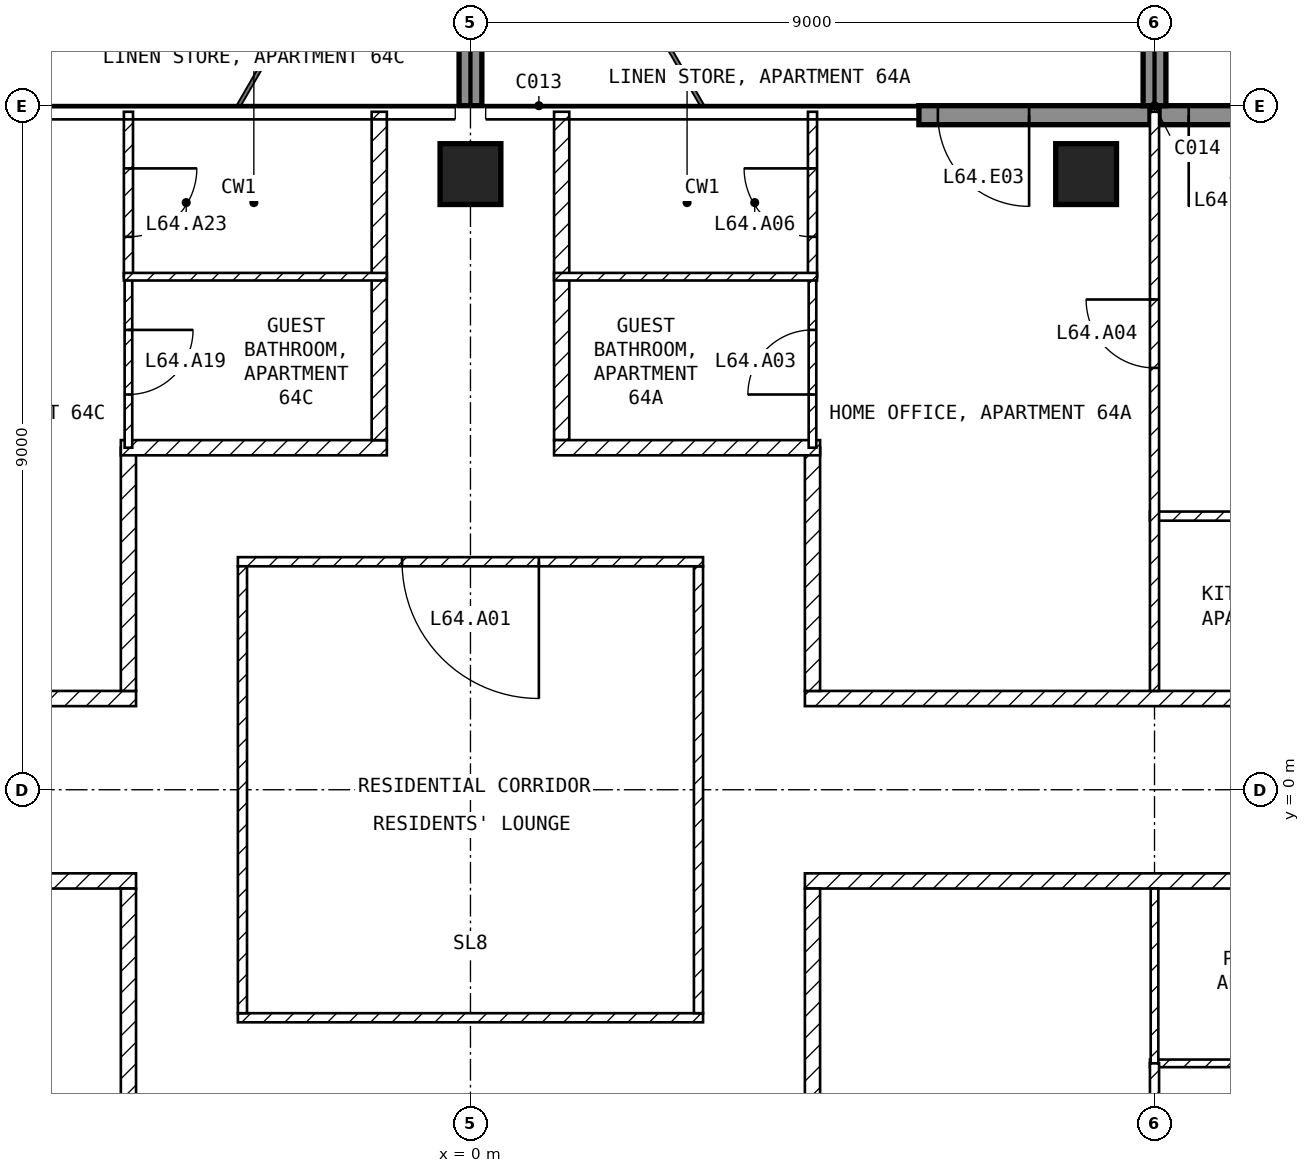
"""IFC4 building model, lengths in metres.
Left out: names, types, materials, properties, quantities, classifications, styles, units other than length and angle.
Written with IfcOpenShell. Run it as: python <this file> out.ifc"""

import sys

from ifc_helpers import new_model, si_unit, direction, frame, frame_2d, origin, origin_2d, place, context, subcontext, project, spatial, rectangle, extrude, element, fill, save


model = new_model("IFC4")
c1 = context("Model", 3, precision=1e-05, world=origin(), true_north=direction((0.0, 1.0)))
c2 = subcontext(c1, "Body", "Model", "MODEL_VIEW")
j1 = project(units=[si_unit("LENGTHUNIT", "METRE"), si_unit("PLANEANGLEUNIT", "RADIAN")], contexts=[c1])
p1 = place(None, origin())
s1 = spatial("IfcSite", under=j1, at=p1, CompositionType="ELEMENT")
p2 = place(p1, origin())
s2 = spatial("IfcBuilding", under=s1, at=p2, CompositionType="ELEMENT")
p3 = place(p2, frame((0.0, 0.0, 253.5)))
s3 = spatial("IfcBuildingStorey", under=s2, at=p3, CompositionType="ELEMENT", Elevation=253.5)
for number, where, z_axis, x_axis in (
    (1, (0.0, 8.1, -0.25), (0.0, 0.0, 1.0), (1.0, 0.0, 0.0)),
    (2, (8.1, 8.1, -0.25), (0.0, 0.0, 1.0), (1.0, 0.0, 0.0)),
):
    element("IfcColumn", number, at=place(p3, frame(where, z_axis=z_axis, x_axis=x_axis)), inside=s3, PredefinedType="COLUMN", context=c2, shape_type="SweptSolid", body=[
        extrude(rectangle(XDim=0.8, YDim=0.8, at=origin_2d()), origin(), (0.0, 0.0, 1.0), 3.5),
    ])
p4 = place(p3, frame((10.9, 8.875, 0.0), z_axis=(0.0, 0.0, 1.0), x_axis=(-1.0, 0.0, 0.0)))
e3 = element("IfcWall", 3, at=p4, inside=s3, PredefinedType="SOLIDWALL", context=c2, shape_type="SweptSolid", body=[
    extrude(rectangle(XDim=1.84, YDim=0.25, at=frame_2d((0.92, 0.0))), origin(), (0.0, 0.0, 1.0), 3.25),
])
p5 = place(p4, frame((0.25, 0.0, 0.0)))
e4 = element("IfcOpeningElement", 4, at=p5, cuts=e3, PredefinedType="OPENING", context=c2, shape_type="SweptSolid", body=[
    extrude(rectangle(XDim=1.2, YDim=2.4, at=frame_2d((0.6, 1.2))), frame((0.0, 0.135, 0.0), z_axis=(0.0, -1.0, 0.0), x_axis=(1.0, 0.0, 0.0)), (0.0, 0.0, 1.0), 0.27),
])
p6 = place(p3, frame((8.94, 8.875, 0.0), z_axis=(0.0, 0.0, 1.0), x_axis=(-1.0, 0.0, 0.0)))
e5 = element("IfcWall", 5, at=p6, inside=s3, PredefinedType="SOLIDWALL", context=c2, shape_type="SweptSolid", body=[
    extrude(rectangle(XDim=3.04, YDim=0.25, at=frame_2d((1.52, 0.0))), origin(), (0.0, 0.0, 1.0), 3.25),
])
p7 = place(p6, frame((1.59, 0.0, 0.0)))
e6 = element("IfcOpeningElement", 6, at=p7, cuts=e5, PredefinedType="OPENING", context=c2, shape_type="SweptSolid", body=[
    extrude(rectangle(XDim=1.2, YDim=2.4, at=frame_2d((0.6, 1.2))), frame((0.0, 0.135, 0.0), z_axis=(0.0, -1.0, 0.0), x_axis=(1.0, 0.0, 0.0)), (0.0, 0.0, 1.0), 0.27),
])
for number, where, z_axis, x_axis in (
    (7, (0.0, 9.0, 0.0), (0.0, 0.0, 1.0), (0.0, 1.0, 0.0)),
    (8, (9.0, 9.0, 0.0), (0.0, 0.0, 1.0), (0.0, 1.0, 0.0)),
):
    element("IfcWall", number, at=place(p3, frame(where, z_axis=z_axis, x_axis=x_axis)), inside=s3, PredefinedType="SOLIDWALL", context=c2, shape_type="SweptSolid", body=[
        extrude(rectangle(XDim=2.7, YDim=0.3, at=frame_2d((1.35, 0.0))), origin(), (0.0, 0.0, 1.0), 3.25),
    ])
p8 = place(p3, frame((-3.06, -3.0, 0.0), z_axis=(0.0, 0.0, 1.0), x_axis=(1.0, 0.0, 0.0)))
e9 = element("IfcWall", 9, at=p8, inside=s3, PredefinedType="PARTITIONING", context=c2, shape_type="SweptSolid", body=[
    extrude(rectangle(XDim=6.12, YDim=0.12, at=frame_2d((3.06, 0.0))), origin(), (0.0, 0.0, 1.0), 3.25),
])
p9 = place(p3, frame((3.0, -2.94, 0.0), z_axis=(0.0, 0.0, 1.0), x_axis=(0.0, 1.0, 0.0)))
e10 = element("IfcWall", 10, at=p9, inside=s3, PredefinedType="PARTITIONING", context=c2, shape_type="SweptSolid", body=[
    extrude(rectangle(XDim=5.88, YDim=0.12, at=frame_2d((2.94, 0.0))), origin(), (0.0, 0.0, 1.0), 3.25),
])
p10 = place(p3, frame((3.06, 3.0, 0.0), z_axis=(0.0, 0.0, 1.0), x_axis=(-1.0, 0.0, 0.0)))
e11 = element("IfcWall", 11, at=p10, inside=s3, PredefinedType="PARTITIONING", context=c2, shape_type="SweptSolid", body=[
    extrude(rectangle(XDim=6.12, YDim=0.12, at=frame_2d((3.06, 0.0))), origin(), (0.0, 0.0, 1.0), 3.25),
])
p11 = place(p10, frame((2.16, 0.0, 0.0)))
e12 = element("IfcOpeningElement", 12, at=p11, cuts=e11, PredefinedType="OPENING", context=c2, shape_type="SweptSolid", body=[
    extrude(rectangle(XDim=1.8, YDim=2.1, at=frame_2d((0.9, 1.05))), frame((0.0, 0.07, 0.0), z_axis=(0.0, -1.0, 0.0), x_axis=(1.0, 0.0, 0.0)), (0.0, 0.0, 1.0), 0.14),
])
p12 = place(p3, frame((-3.0, 2.94, 0.0), z_axis=(0.0, 0.0, 1.0), x_axis=(0.0, -1.0, 0.0)))
e13 = element("IfcWall", 13, at=p12, inside=s3, PredefinedType="PARTITIONING", context=c2, shape_type="SweptSolid", body=[
    extrude(rectangle(XDim=5.88, YDim=0.12, at=frame_2d((2.94, 0.0))), origin(), (0.0, 0.0, 1.0), 3.25),
])
p13 = place(p3, frame((4.4, 1.2, 0.0), z_axis=(0.0, 0.0, 1.0), x_axis=(1.0, 0.0, 0.0)))
e14 = element("IfcWall", 14, at=p13, inside=s3, PredefinedType="PARTITIONING", context=c2, shape_type="SweptSolid", body=[
    extrude(rectangle(XDim=17.2, YDim=0.2, at=frame_2d((8.6, 0.0))), origin(), (0.0, 0.0, 1.0), 3.25),
])
p14 = place(p13, frame((8.675, 0.0, 0.0)))
e15 = element("IfcOpeningElement", 15, at=p14, cuts=e14, PredefinedType="OPENING", context=c2, shape_type="SweptSolid", body=[
    extrude(rectangle(XDim=1.0, YDim=2.1, at=frame_2d((0.5, 1.05))), frame((0.0, 0.11, 0.0), z_axis=(0.0, -1.0, 0.0), x_axis=(1.0, 0.0, 0.0)), (0.0, 0.0, 1.0), 0.22),
])
p15 = place(p3, frame((4.5, 4.5, 0.0), z_axis=(0.0, 0.0, 1.0), x_axis=(0.0, -1.0, 0.0)))
e16 = element("IfcWall", 16, at=p15, inside=s3, PredefinedType="PARTITIONING", context=c2, shape_type="SweptSolid", body=[
    extrude(rectangle(XDim=3.2, YDim=0.2, at=frame_2d((1.6, 0.0))), origin(), (0.0, 0.0, 1.0), 3.25),
])
p16 = place(p3, frame((1.2, 8.92, 0.0), z_axis=(0.0, 0.0, 1.0), x_axis=(0.0, -1.0, 0.0)))
e17 = element("IfcWall", 17, at=p16, inside=s3, PredefinedType="PARTITIONING", context=c2, shape_type="SweptSolid", body=[
    extrude(rectangle(XDim=4.32, YDim=0.2, at=frame_2d((2.16, 0.0))), origin(), (0.0, 0.0, 1.0), 3.25),
])
p17 = place(p3, frame((1.1, 4.5, 0.0), z_axis=(0.0, 0.0, 1.0), x_axis=(1.0, 0.0, 0.0)))
e18 = element("IfcWall", 18, at=p17, inside=s3, PredefinedType="PARTITIONING", context=c2, shape_type="SweptSolid", body=[
    extrude(rectangle(XDim=3.5, YDim=0.2, at=frame_2d((1.75, 0.0))), origin(), (0.0, 0.0, 1.0), 3.25),
])
p18 = place(p3, frame((21.6, -1.2, 0.0), z_axis=(0.0, 0.0, 1.0), x_axis=(-1.0, 0.0, 0.0)))
e19 = element("IfcWall", 19, at=p18, inside=s3, PredefinedType="PARTITIONING", context=c2, shape_type="SweptSolid", body=[
    extrude(rectangle(XDim=17.2, YDim=0.2, at=frame_2d((8.6, 0.0))), origin(), (0.0, 0.0, 1.0), 3.25),
])
p19 = place(p18, frame((3.85, 0.0, 0.0)))
e20 = element("IfcOpeningElement", 20, at=p19, cuts=e19, PredefinedType="OPENING", context=c2, shape_type="SweptSolid", body=[
    extrude(rectangle(XDim=1.0, YDim=2.1, at=frame_2d((0.5, 1.05))), frame((0.0, 0.11, 0.0), z_axis=(0.0, -1.0, 0.0), x_axis=(1.0, 0.0, 0.0)), (0.0, 0.0, 1.0), 0.22),
])
p20 = place(p3, frame((4.5, -1.3, 0.0), z_axis=(0.0, 0.0, 1.0), x_axis=(0.0, -1.0, 0.0)))
e21 = element("IfcWall", 21, at=p20, inside=s3, PredefinedType="PARTITIONING", context=c2, shape_type="SweptSolid", body=[
    extrude(rectangle(XDim=3.2, YDim=0.2, at=frame_2d((1.6, 0.0))), origin(), (0.0, 0.0, 1.0), 3.25),
])
p21 = place(p3, frame((-21.6, 1.2, 0.0), z_axis=(0.0, 0.0, 1.0), x_axis=(1.0, 0.0, 0.0)))
e22 = element("IfcWall", 22, at=p21, inside=s3, PredefinedType="PARTITIONING", context=c2, shape_type="SweptSolid", body=[
    extrude(rectangle(XDim=17.2, YDim=0.2, at=frame_2d((8.6, 0.0))), origin(), (0.0, 0.0, 1.0), 3.25),
])
p22 = place(p21, frame((6.1, 0.0, 0.0)))
e23 = element("IfcOpeningElement", 23, at=p22, cuts=e22, PredefinedType="OPENING", context=c2, shape_type="SweptSolid", body=[
    extrude(rectangle(XDim=1.0, YDim=2.1, at=frame_2d((0.5, 1.05))), frame((0.0, 0.11, 0.0), z_axis=(0.0, -1.0, 0.0), x_axis=(1.0, 0.0, 0.0)), (0.0, 0.0, 1.0), 0.22),
])
p23 = place(p3, frame((-4.5, 1.3, 0.0), z_axis=(0.0, 0.0, 1.0), x_axis=(0.0, 1.0, 0.0)))
e24 = element("IfcWall", 24, at=p23, inside=s3, PredefinedType="PARTITIONING", context=c2, shape_type="SweptSolid", body=[
    extrude(rectangle(XDim=3.2, YDim=0.2, at=frame_2d((1.6, 0.0))), origin(), (0.0, 0.0, 1.0), 3.25),
])
p24 = place(p3, frame((-4.6, 4.5, 0.0), z_axis=(0.0, 0.0, 1.0), x_axis=(1.0, 0.0, 0.0)))
e25 = element("IfcWall", 25, at=p24, inside=s3, PredefinedType="PARTITIONING", context=c2, shape_type="SweptSolid", body=[
    extrude(rectangle(XDim=3.5, YDim=0.2, at=frame_2d((1.75, 0.0))), origin(), (0.0, 0.0, 1.0), 3.25),
])
p25 = place(p3, frame((-1.2, 4.6, 0.0), z_axis=(0.0, 0.0, 1.0), x_axis=(0.0, 1.0, 0.0)))
e26 = element("IfcWall", 26, at=p25, inside=s3, PredefinedType="PARTITIONING", context=c2, shape_type="SweptSolid", body=[
    extrude(rectangle(XDim=4.32, YDim=0.2, at=frame_2d((2.16, 0.0))), origin(), (0.0, 0.0, 1.0), 3.25),
])
p26 = place(p3, frame((-4.4, -1.2, 0.0), z_axis=(0.0, 0.0, 1.0), x_axis=(-1.0, 0.0, 0.0)))
e27 = element("IfcWall", 27, at=p26, inside=s3, PredefinedType="PARTITIONING", context=c2, shape_type="SweptSolid", body=[
    extrude(rectangle(XDim=17.2, YDim=0.2, at=frame_2d((8.6, 0.0))), origin(), (0.0, 0.0, 1.0), 3.25),
])
p27 = place(p26, frame((12.05, 0.0, 0.0)))
e28 = element("IfcOpeningElement", 28, at=p27, cuts=e27, PredefinedType="OPENING", context=c2, shape_type="SweptSolid", body=[
    extrude(rectangle(XDim=1.0, YDim=2.1, at=frame_2d((0.5, 1.05))), frame((0.0, 0.11, 0.0), z_axis=(0.0, -1.0, 0.0), x_axis=(1.0, 0.0, 0.0)), (0.0, 0.0, 1.0), 0.22),
])
p28 = place(p3, frame((-4.5, -4.5, 0.0), z_axis=(0.0, 0.0, 1.0), x_axis=(0.0, 1.0, 0.0)))
e29 = element("IfcWall", 29, at=p28, inside=s3, PredefinedType="PARTITIONING", context=c2, shape_type="SweptSolid", body=[
    extrude(rectangle(XDim=3.2, YDim=0.2, at=frame_2d((1.6, 0.0))), origin(), (0.0, 0.0, 1.0), 3.25),
])
p29 = place(p3, frame((8.94, 3.6, 0.0), z_axis=(0.0, 0.0, 1.0), x_axis=(1.0, 0.0, 0.0)))
e30 = element("IfcWall", 30, at=p29, inside=s3, PredefinedType="PARTITIONING", context=c2, shape_type="SweptSolid", body=[
    extrude(rectangle(XDim=9.51, YDim=0.12, at=frame_2d((4.755, 0.0))), origin(), (0.0, 0.0, 1.0), 3.25),
])
p30 = place(p29, frame((4.185, 0.0, 0.0)))
e31 = element("IfcOpeningElement", 31, at=p30, cuts=e30, PredefinedType="OPENING", context=c2, shape_type="SweptSolid", body=[
    extrude(rectangle(XDim=0.9, YDim=2.1, at=frame_2d((0.45, 1.05))), frame((0.0, 0.07, 0.0), z_axis=(0.0, -1.0, 0.0), x_axis=(1.0, 0.0, 0.0)), (0.0, 0.0, 1.0), 0.14),
])
p31 = place(p3, frame((9.0, 1.3, 0.0), z_axis=(0.0, 0.0, 1.0), x_axis=(0.0, 1.0, 0.0)))
e32 = element("IfcWall", 32, at=p31, inside=s3, PredefinedType="PARTITIONING", context=c2, shape_type="SweptSolid", body=[
    extrude(rectangle(XDim=7.62, YDim=0.12, at=frame_2d((3.81, 0.0))), origin(), (0.0, 0.0, 1.0), 3.25),
])
p32 = place(p31, frame((4.25, 0.0, 0.0)))
e33 = element("IfcOpeningElement", 33, at=p32, cuts=e32, PredefinedType="OPENING", context=c2, shape_type="SweptSolid", body=[
    extrude(rectangle(XDim=0.9, YDim=2.1, at=frame_2d((0.45, 1.05))), frame((0.0, 0.07, 0.0), z_axis=(0.0, -1.0, 0.0), x_axis=(1.0, 0.0, 0.0)), (0.0, 0.0, 1.0), 0.14),
])
p33 = place(p3, frame((4.5, 4.5, 0.0), z_axis=(0.0, 0.0, 1.0), x_axis=(0.0, 1.0, 0.0)))
e34 = element("IfcWall", 34, at=p33, inside=s3, PredefinedType="PARTITIONING", context=c2, shape_type="SweptSolid", body=[
    extrude(rectangle(XDim=2.25, YDim=0.1, at=frame_2d((1.125, 0.0))), origin(), (0.0, 0.0, 1.0), 3.25),
])
p34 = place(p33, frame((0.7, 0.0, 0.0)))
e35 = element("IfcOpeningElement", 35, at=p34, cuts=e34, PredefinedType="OPENING", context=c2, shape_type="SweptSolid", body=[
    extrude(rectangle(XDim=0.85, YDim=2.1, at=frame_2d((0.425, 1.05))), frame((0.0, 0.06, 0.0), z_axis=(0.0, -1.0, 0.0), x_axis=(1.0, 0.0, 0.0)), (0.0, 0.0, 1.0), 0.12),
])
p35 = place(p3, frame((4.5, 6.75, 0.0), z_axis=(0.0, 0.0, 1.0), x_axis=(0.0, 1.0, 0.0)))
e36 = element("IfcWall", 36, at=p35, inside=s3, PredefinedType="PARTITIONING", context=c2, shape_type="SweptSolid", body=[
    extrude(rectangle(XDim=2.17, YDim=0.12, at=frame_2d((1.085, 0.0))), origin(), (0.0, 0.0, 1.0), 3.25),
])
p36 = place(p35, frame((0.525, 0.0, 0.0)))
e37 = element("IfcOpeningElement", 37, at=p36, cuts=e36, PredefinedType="OPENING", context=c2, shape_type="SweptSolid", body=[
    extrude(rectangle(XDim=0.9, YDim=2.1, at=frame_2d((0.45, 1.05))), frame((0.0, 0.07, 0.0), z_axis=(0.0, -1.0, 0.0), x_axis=(1.0, 0.0, 0.0)), (0.0, 0.0, 1.0), 0.14),
])
p37 = place(p3, frame((1.1, 6.75, 0.0), z_axis=(0.0, 0.0, 1.0), x_axis=(1.0, 0.0, 0.0)))
e38 = element("IfcWall", 38, at=p37, inside=s3, PredefinedType="PARTITIONING", context=c2, shape_type="SweptSolid", body=[
    extrude(rectangle(XDim=3.46, YDim=0.1, at=frame_2d((1.73, 0.0))), origin(), (0.0, 0.0, 1.0), 3.25),
])
p38 = place(p3, frame((12.6, -3.6, 0.0), z_axis=(0.0, 0.0, 1.0), x_axis=(-1.0, 0.0, 0.0)))
e39 = element("IfcWall", 39, at=p38, inside=s3, PredefinedType="PARTITIONING", context=c2, shape_type="SweptSolid", body=[
    extrude(rectangle(XDim=3.66, YDim=0.1, at=frame_2d((1.83, 0.0))), origin(), (0.0, 0.0, 1.0), 3.25),
])
p39 = place(p38, frame((1.375, 0.0, 0.0)))
e40 = element("IfcOpeningElement", 40, at=p39, cuts=e39, PredefinedType="OPENING", context=c2, shape_type="SweptSolid", body=[
    extrude(rectangle(XDim=0.85, YDim=2.1, at=frame_2d((0.425, 1.05))), frame((0.0, 0.06, 0.0), z_axis=(0.0, -1.0, 0.0), x_axis=(1.0, 0.0, 0.0)), (0.0, 0.0, 1.0), 0.12),
])
p40 = place(p3, frame((9.0, -3.6, 0.0), z_axis=(0.0, 0.0, 1.0), x_axis=(0.0, 1.0, 0.0)))
e41 = element("IfcWall", 41, at=p40, inside=s3, PredefinedType="PARTITIONING", context=c2, shape_type="SweptSolid", body=[
    extrude(rectangle(XDim=2.3, YDim=0.1, at=frame_2d((1.15, 0.0))), origin(), (0.0, 0.0, 1.0), 3.25),
])
p41 = place(p3, frame((9.0, -8.92, 0.0), z_axis=(0.0, 0.0, 1.0), x_axis=(0.0, 1.0, 0.0)))
e42 = element("IfcWall", 42, at=p41, inside=s3, PredefinedType="PARTITIONING", context=c2, shape_type="SweptSolid", body=[
    extrude(rectangle(XDim=5.32, YDim=0.12, at=frame_2d((2.66, 0.0))), origin(), (0.0, 0.0, 1.0), 3.25),
])
p42 = place(p41, frame((2.32, 0.0, 0.0)))
e43 = element("IfcOpeningElement", 43, at=p42, cuts=e42, PredefinedType="OPENING", context=c2, shape_type="SweptSolid", body=[
    extrude(rectangle(XDim=0.9, YDim=2.1, at=frame_2d((0.45, 1.05))), frame((0.0, 0.07, 0.0), z_axis=(0.0, -1.0, 0.0), x_axis=(1.0, 0.0, 0.0)), (0.0, 0.0, 1.0), 0.14),
])
p43 = place(p3, frame((-4.5, 6.75, 0.0), z_axis=(0.0, 0.0, 1.0), x_axis=(0.0, -1.0, 0.0)))
e44 = element("IfcWall", 44, at=p43, inside=s3, PredefinedType="PARTITIONING", context=c2, shape_type="SweptSolid", body=[
    extrude(rectangle(XDim=2.25, YDim=0.1, at=frame_2d((1.125, 0.0))), origin(), (0.0, 0.0, 1.0), 3.25),
])
p44 = place(p43, frame((0.7, 0.0, 0.0)))
e45 = element("IfcOpeningElement", 45, at=p44, cuts=e44, PredefinedType="OPENING", context=c2, shape_type="SweptSolid", body=[
    extrude(rectangle(XDim=0.85, YDim=2.1, at=frame_2d((0.425, 1.05))), frame((0.0, 0.06, 0.0), z_axis=(0.0, -1.0, 0.0), x_axis=(1.0, 0.0, 0.0)), (0.0, 0.0, 1.0), 0.12),
])
p45 = place(p3, frame((-4.5, 8.92, 0.0), z_axis=(0.0, 0.0, 1.0), x_axis=(0.0, -1.0, 0.0)))
e46 = element("IfcWall", 46, at=p45, inside=s3, PredefinedType="PARTITIONING", context=c2, shape_type="SweptSolid", body=[
    extrude(rectangle(XDim=2.17, YDim=0.12, at=frame_2d((1.085, 0.0))), origin(), (0.0, 0.0, 1.0), 3.25),
])
p46 = place(p45, frame((0.745, 0.0, 0.0)))
e47 = element("IfcOpeningElement", 47, at=p46, cuts=e46, PredefinedType="OPENING", context=c2, shape_type="SweptSolid", body=[
    extrude(rectangle(XDim=0.9, YDim=2.1, at=frame_2d((0.45, 1.05))), frame((0.0, 0.07, 0.0), z_axis=(0.0, -1.0, 0.0), x_axis=(1.0, 0.0, 0.0)), (0.0, 0.0, 1.0), 0.14),
])
p47 = place(p3, frame((-4.56, 6.75, 0.0), z_axis=(0.0, 0.0, 1.0), x_axis=(1.0, 0.0, 0.0)))
e48 = element("IfcWall", 48, at=p47, inside=s3, PredefinedType="PARTITIONING", context=c2, shape_type="SweptSolid", body=[
    extrude(rectangle(XDim=3.46, YDim=0.1, at=frame_2d((1.73, 0.0))), origin(), (0.0, 0.0, 1.0), 3.25),
])
p48 = place(p5, origin())
e49 = element("IfcDoor", 49, at=p48, inside=s3, OperationType="SINGLE_SWING_RIGHT", PredefinedType="DOOR", context=c2, shape_type="SweptSolid", body=[
    extrude(rectangle(XDim=1.2, YDim=2.4, at=frame_2d((0.6, 1.2))), frame((0.0, 0.025, 0.0), z_axis=(0.0, -1.0, 0.0), x_axis=(1.0, 0.0, 0.0)), (0.0, 0.0, 1.0), 0.05),
])
fill(e4, e49)
p49 = place(p7, origin())
e50 = element("IfcDoor", 50, at=p49, inside=s3, OperationType="SINGLE_SWING_LEFT", PredefinedType="DOOR", context=c2, shape_type="SweptSolid", body=[
    extrude(rectangle(XDim=1.2, YDim=2.4, at=frame_2d((0.6, 1.2))), frame((0.0, 0.025, 0.0), z_axis=(0.0, -1.0, 0.0), x_axis=(1.0, 0.0, 0.0)), (0.0, 0.0, 1.0), 0.05),
])
fill(e6, e50)
p50 = place(p11, origin())
e51 = element("IfcDoor", 51, at=p50, inside=s3, OperationType="SINGLE_SWING_LEFT", PredefinedType="DOOR", context=c2, shape_type="SweptSolid", body=[
    extrude(rectangle(XDim=1.8, YDim=2.1, at=frame_2d((0.9, 1.05))), frame((0.0, 0.025, 0.0), z_axis=(0.0, -1.0, 0.0), x_axis=(1.0, 0.0, 0.0)), (0.0, 0.0, 1.0), 0.05),
])
fill(e12, e51)
p51 = place(p34, origin())
e52 = element("IfcDoor", 52, at=p51, inside=s3, OperationType="SINGLE_SWING_LEFT", PredefinedType="DOOR", context=c2, shape_type="SweptSolid", body=[
    extrude(rectangle(XDim=0.85, YDim=2.1, at=frame_2d((0.425, 1.05))), frame((0.0, 0.025, 0.0), z_axis=(0.0, -1.0, 0.0), x_axis=(1.0, 0.0, 0.0)), (0.0, 0.0, 1.0), 0.05),
])
fill(e35, e52)
p52 = place(p32, origin())
e53 = element("IfcDoor", 53, at=p52, inside=s3, OperationType="SINGLE_SWING_RIGHT", PredefinedType="DOOR", context=c2, shape_type="SweptSolid", body=[
    extrude(rectangle(XDim=0.9, YDim=2.1, at=frame_2d((0.45, 1.05))), frame((0.0, 0.025, 0.0), z_axis=(0.0, -1.0, 0.0), x_axis=(1.0, 0.0, 0.0)), (0.0, 0.0, 1.0), 0.05),
])
fill(e33, e53)
p53 = place(p36, origin())
e54 = element("IfcDoor", 54, at=p53, inside=s3, OperationType="SINGLE_SWING_RIGHT", PredefinedType="DOOR", context=c2, shape_type="SweptSolid", body=[
    extrude(rectangle(XDim=0.9, YDim=2.1, at=frame_2d((0.45, 1.05))), frame((0.0, 0.025, 0.0), z_axis=(0.0, -1.0, 0.0), x_axis=(1.0, 0.0, 0.0)), (0.0, 0.0, 1.0), 0.05),
])
fill(e37, e54)
p54 = place(p44, origin())
e55 = element("IfcDoor", 55, at=p54, inside=s3, OperationType="SINGLE_SWING_LEFT", PredefinedType="DOOR", context=c2, shape_type="SweptSolid", body=[
    extrude(rectangle(XDim=0.85, YDim=2.1, at=frame_2d((0.425, 1.05))), frame((0.0, 0.025, 0.0), z_axis=(0.0, -1.0, 0.0), x_axis=(1.0, 0.0, 0.0)), (0.0, 0.0, 1.0), 0.05),
])
fill(e45, e55)
p55 = place(p46, origin())
e56 = element("IfcDoor", 56, at=p55, inside=s3, OperationType="SINGLE_SWING_LEFT", PredefinedType="DOOR", context=c2, shape_type="SweptSolid", body=[
    extrude(rectangle(XDim=0.9, YDim=2.1, at=frame_2d((0.45, 1.05))), frame((0.0, 0.025, 0.0), z_axis=(0.0, -1.0, 0.0), x_axis=(1.0, 0.0, 0.0)), (0.0, 0.0, 1.0), 0.05),
])
fill(e47, e56)
save(model, sys.argv[1])
